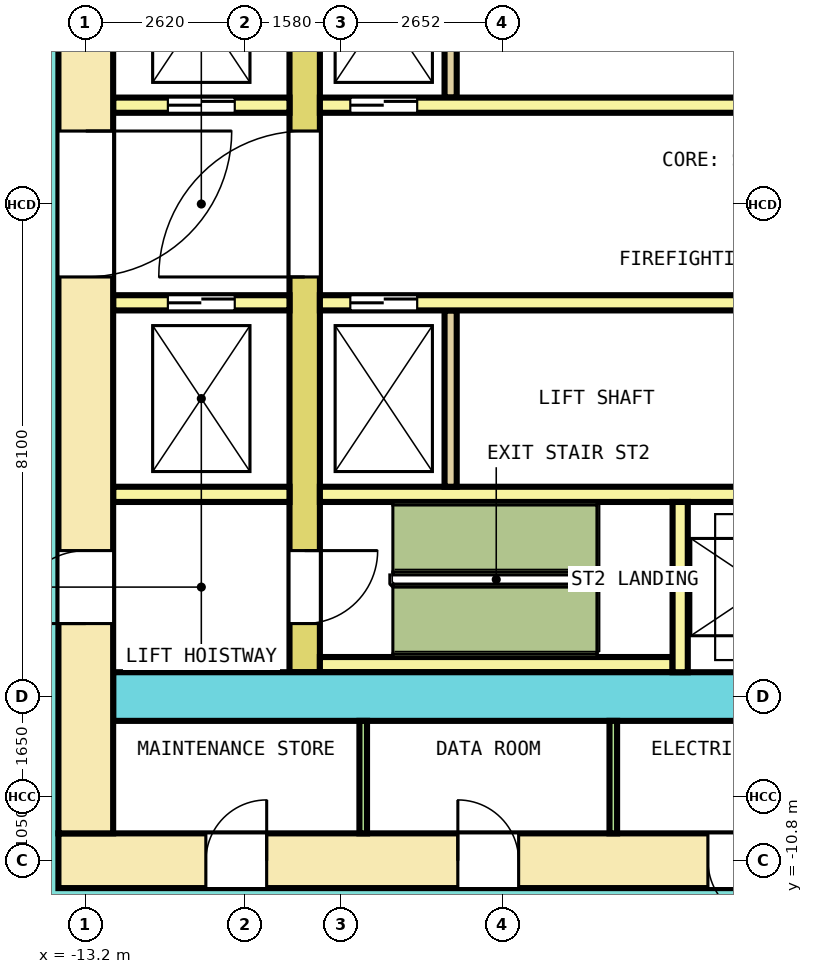
"""IFC4 building model, lengths in metres.
Left out: names, types, materials, properties, quantities, classifications, styles, units other than length and angle.
Written with IfcOpenShell. Run it as: python <this file> out.ifc"""

import sys

from ifc_helpers import new_model, si_unit, direction, frame, frame_2d, origin, place, context, subcontext, project, spatial, rectangle, extrude, element, fill, save


model = new_model("IFC4")
c1 = context("Model", 3, precision=1e-05, world=origin(), true_north=direction((0.0, 1.0)))
c2 = subcontext(c1, "Body", "Model", "MODEL_VIEW")
j1 = project(units=[si_unit("LENGTHUNIT", "METRE"), si_unit("PLANEANGLEUNIT", "RADIAN")], contexts=[c1])
p1 = place(None, origin())
s1 = spatial("IfcSite", under=j1, at=p1, CompositionType="ELEMENT")
p2 = place(p1, origin())
s2 = spatial("IfcBuilding", under=s1, at=p2, CompositionType="ELEMENT")
p3 = place(p2, frame((0.0, 0.0, 5.6)))
s3 = spatial("IfcBuildingStorey", under=s2, at=p3, CompositionType="ELEMENT", Elevation=5.6)
p4 = place(p3, frame((-13.65, -10.8, 0.0), z_axis=(0.0, 0.0, 1.0), x_axis=(1.0, 0.0, 0.0)))
e1 = element("IfcWall", 1, at=p4, inside=s3, PredefinedType="SHEAR", context=c2, shape_type="SweptSolid", body=[
    extrude(rectangle(XDim=27.3, YDim=0.9, at=frame_2d((13.65, 0.0))), origin(), (0.0, 0.0, 1.0), 4.3),
])
p5 = place(p4, frame((2.425, 0.0, 0.0)))
e2 = element("IfcOpeningElement", 2, at=p5, cuts=e1, PredefinedType="OPENING", context=c2, shape_type="SweptSolid", body=[
    extrude(rectangle(XDim=1.0, YDim=2.1, at=frame_2d((0.5, 1.05))), frame((0.0, 0.46, 0.0), z_axis=(0.0, -1.0, 0.0), x_axis=(1.0, 0.0, 0.0)), (0.0, 0.0, 1.0), 0.92),
])
p6 = place(p4, frame((6.569, 0.0, 0.0)))
e3 = element("IfcOpeningElement", 3, at=p6, cuts=e1, PredefinedType="OPENING", context=c2, shape_type="SweptSolid", body=[
    extrude(rectangle(XDim=1.0, YDim=2.1, at=frame_2d((0.5, 1.05))), frame((0.0, 0.46, 0.0), z_axis=(0.0, -1.0, 0.0), x_axis=(1.0, 0.0, 0.0)), (0.0, 0.0, 1.0), 0.92),
])
p7 = place(p4, frame((10.681, 0.0, 0.0)))
e4 = element("IfcOpeningElement", 4, at=p7, cuts=e1, PredefinedType="OPENING", context=c2, shape_type="SweptSolid", body=[
    extrude(rectangle(XDim=1.0, YDim=2.1, at=frame_2d((0.5, 1.05))), frame((0.0, 0.46, 0.0), z_axis=(0.0, -1.0, 0.0), x_axis=(1.0, 0.0, 0.0)), (0.0, 0.0, 1.0), 0.92),
])
p8 = place(p4, frame((19.202, 0.0, 0.0)))
e5 = element("IfcOpeningElement", 5, at=p8, cuts=e1, PredefinedType="OPENING", context=c2, shape_type="SweptSolid", body=[
    extrude(rectangle(XDim=1.0, YDim=2.1, at=frame_2d((0.5, 1.05))), frame((0.0, 0.46, 0.0), z_axis=(0.0, -1.0, 0.0), x_axis=(1.0, 0.0, 0.0)), (0.0, 0.0, 1.0), 0.92),
])
p9 = place(p4, frame((21.881, 0.0, 0.0)))
e6 = element("IfcOpeningElement", 6, at=p9, cuts=e1, PredefinedType="OPENING", context=c2, shape_type="SweptSolid", body=[
    extrude(rectangle(XDim=1.0, YDim=2.1, at=frame_2d((0.5, 1.05))), frame((0.0, 0.46, 0.0), z_axis=(0.0, -1.0, 0.0), x_axis=(1.0, 0.0, 0.0)), (0.0, 0.0, 1.0), 0.92),
])
p10 = place(p4, frame((24.592, 0.0, 0.0)))
e7 = element("IfcOpeningElement", 7, at=p10, cuts=e1, PredefinedType="OPENING", context=c2, shape_type="SweptSolid", body=[
    extrude(rectangle(XDim=1.0, YDim=2.1, at=frame_2d((0.5, 1.05))), frame((0.0, 0.46, 0.0), z_axis=(0.0, -1.0, 0.0), x_axis=(1.0, 0.0, 0.0)), (0.0, 0.0, 1.0), 0.92),
])
p11 = place(p4, frame((15.2, 0.0, 0.0)))
e8 = element("IfcOpeningElement", 8, at=p11, cuts=e1, PredefinedType="OPENING", context=c2, shape_type="SweptSolid", body=[
    extrude(rectangle(XDim=1.2, YDim=2.1, at=frame_2d((0.6, 1.05))), frame((0.0, 0.46, 0.0), z_axis=(0.0, -1.0, 0.0), x_axis=(1.0, 0.0, 0.0)), (0.0, 0.0, 1.0), 0.92),
])
p12 = place(p3, frame((-13.2, -10.35, 0.0), z_axis=(0.0, 0.0, 1.0), x_axis=(0.0, 1.0, 0.0)))
e9 = element("IfcWall", 9, at=p12, inside=s3, PredefinedType="SHEAR", context=c2, shape_type="SweptSolid", body=[
    extrude(rectangle(XDim=20.7, YDim=0.9, at=frame_2d((10.35, 0.0))), origin(), (0.0, 0.0, 1.0), 4.3),
])
p13 = place(p12, frame((9.15, 0.0, 0.0)))
e10 = element("IfcOpeningElement", 10, at=p13, cuts=e9, PredefinedType="OPENING", context=c2, shape_type="SweptSolid", body=[
    extrude(rectangle(XDim=2.4, YDim=2.1, at=frame_2d((1.2, 1.05))), frame((0.0, 0.46, 0.0), z_axis=(0.0, -1.0, 0.0), x_axis=(1.0, 0.0, 0.0)), (0.0, 0.0, 1.0), 0.92),
])
p14 = place(p12, frame((16.05, 0.0, 0.0)))
e11 = element("IfcOpeningElement", 11, at=p14, cuts=e9, PredefinedType="OPENING", context=c2, shape_type="SweptSolid", body=[
    extrude(rectangle(XDim=1.2, YDim=2.1, at=frame_2d((0.6, 1.05))), frame((0.0, 0.46, 0.0), z_axis=(0.0, -1.0, 0.0), x_axis=(1.0, 0.0, 0.0)), (0.0, 0.0, 1.0), 0.92),
])
p15 = place(p12, frame((3.45, 0.0, 0.0)))
e12 = element("IfcOpeningElement", 12, at=p15, cuts=e9, PredefinedType="OPENING", context=c2, shape_type="SweptSolid", body=[
    extrude(rectangle(XDim=1.2, YDim=2.1, at=frame_2d((0.6, 1.05))), frame((0.0, 0.46, 0.0), z_axis=(0.0, -1.0, 0.0), x_axis=(1.0, 0.0, 0.0)), (0.0, 0.0, 1.0), 0.92),
])
p16 = place(p3, frame((-12.75, -8.1, 0.0), z_axis=(0.0, 0.0, 1.0), x_axis=(1.0, 0.0, 0.0)))
e13 = element("IfcWall", 13, at=p16, inside=s3, PredefinedType="SHEAR", context=c2, shape_type="SweptSolid", body=[
    extrude(rectangle(XDim=25.5, YDim=0.8, at=frame_2d((12.75, 0.0))), origin(), (0.0, 0.0, 1.0), 4.3),
])
p17 = place(p16, frame((14.3, 0.0, 0.0)))
e14 = element("IfcOpeningElement", 14, at=p17, cuts=e13, PredefinedType="OPENING", context=c2, shape_type="SweptSolid", body=[
    extrude(rectangle(XDim=1.2, YDim=2.1, at=frame_2d((0.6, 1.05))), frame((0.0, 0.41, 0.0), z_axis=(0.0, -1.0, 0.0), x_axis=(1.0, 0.0, 0.0)), (0.0, 0.0, 1.0), 0.82),
])
p18 = place(p3, frame((-9.6, -7.7, 0.0), z_axis=(0.0, 0.0, 1.0), x_axis=(0.0, 1.0, 0.0)))
e15 = element("IfcWall", 15, at=p18, inside=s3, PredefinedType="SHEAR", context=c2, shape_type="SweptSolid", body=[
    extrude(rectangle(XDim=15.4, YDim=0.5, at=frame_2d((7.7, 0.0))), origin(), (0.0, 0.0, 1.0), 4.3),
])
p19 = place(p18, frame((6.5, 0.0, 0.0)))
e16 = element("IfcOpeningElement", 16, at=p19, cuts=e15, PredefinedType="OPENING", context=c2, shape_type="SweptSolid", body=[
    extrude(rectangle(XDim=2.4, YDim=2.1, at=frame_2d((1.2, 1.05))), frame((0.0, 0.26, 0.0), z_axis=(0.0, -1.0, 0.0), x_axis=(1.0, 0.0, 0.0)), (0.0, 0.0, 1.0), 0.52),
])
p20 = place(p18, frame((13.4, 0.0, 0.0)))
e17 = element("IfcOpeningElement", 17, at=p20, cuts=e15, PredefinedType="OPENING", context=c2, shape_type="SweptSolid", body=[
    extrude(rectangle(XDim=1.2, YDim=2.1, at=frame_2d((0.6, 1.05))), frame((0.0, 0.26, 0.0), z_axis=(0.0, -1.0, 0.0), x_axis=(1.0, 0.0, 0.0)), (0.0, 0.0, 1.0), 0.52),
])
p21 = place(p18, frame((0.8, 0.0, 0.0)))
e18 = element("IfcOpeningElement", 18, at=p21, cuts=e15, PredefinedType="OPENING", context=c2, shape_type="SweptSolid", body=[
    extrude(rectangle(XDim=1.2, YDim=2.1, at=frame_2d((0.6, 1.05))), frame((0.0, 0.26, 0.0), z_axis=(0.0, -1.0, 0.0), x_axis=(1.0, 0.0, 0.0)), (0.0, 0.0, 1.0), 0.52),
])
p22 = place(p3, frame((-12.75, 1.625, 0.0), z_axis=(0.0, 0.0, 1.0), x_axis=(1.0, 0.0, 0.0)))
e19 = element("IfcWall", 19, at=p22, inside=s3, PredefinedType="SOLIDWALL", context=c2, shape_type="SweptSolid", body=[
    extrude(rectangle(XDim=2.9, YDim=0.25, at=frame_2d((1.45, 0.0))), origin(), (0.0, 0.0, 1.0), 4.3),
])
p23 = place(p22, frame((0.9, 0.0, 0.0)))
e20 = element("IfcOpeningElement", 20, at=p23, cuts=e19, PredefinedType="OPENING", context=c2, shape_type="SweptSolid", body=[
    extrude(rectangle(XDim=1.1, YDim=2.1, at=frame_2d((0.55, 1.05))), frame((0.0, 0.135, 0.0), z_axis=(0.0, -1.0, 0.0), x_axis=(1.0, 0.0, 0.0)), (0.0, 0.0, 1.0), 0.27),
])
p24 = place(p3, frame((-9.35, 1.625, 0.0), z_axis=(0.0, 0.0, 1.0), x_axis=(1.0, 0.0, 0.0)))
e21 = element("IfcWall", 21, at=p24, inside=s3, PredefinedType="SOLIDWALL", context=c2, shape_type="SweptSolid", body=[
    extrude(rectangle(XDim=18.7, YDim=0.25, at=frame_2d((9.35, 0.0))), origin(), (0.0, 0.0, 1.0), 4.3),
])
p25 = place(p24, frame((0.5, 0.0, 0.0)))
e22 = element("IfcOpeningElement", 22, at=p25, cuts=e21, PredefinedType="OPENING", context=c2, shape_type="SweptSolid", body=[
    extrude(rectangle(XDim=1.1, YDim=2.1, at=frame_2d((0.55, 1.05))), frame((0.0, 0.135, 0.0), z_axis=(0.0, -1.0, 0.0), x_axis=(1.0, 0.0, 0.0)), (0.0, 0.0, 1.0), 0.27),
])
p26 = place(p24, frame((17.1, 0.0, 0.0)))
e23 = element("IfcOpeningElement", 23, at=p26, cuts=e21, PredefinedType="OPENING", context=c2, shape_type="SweptSolid", body=[
    extrude(rectangle(XDim=1.1, YDim=2.1, at=frame_2d((0.55, 1.05))), frame((0.0, 0.135, 0.0), z_axis=(0.0, -1.0, 0.0), x_axis=(1.0, 0.0, 0.0)), (0.0, 0.0, 1.0), 0.27),
])
p27 = place(p3, frame((-7.2, 1.75, 0.0), z_axis=(0.0, 0.0, 1.0), x_axis=(0.0, 1.0, 0.0)))
e24 = element("IfcWall", 24, at=p27, inside=s3, PredefinedType="SOLIDWALL", context=c2, shape_type="SweptSolid", body=[
    extrude(rectangle(XDim=2.9, YDim=0.2, at=frame_2d((1.45, 0.0))), origin(), (0.0, 0.0, 1.0), 4.3),
])
p28 = place(p3, frame((-12.75, -1.625, 0.0), z_axis=(0.0, 0.0, 1.0), x_axis=(1.0, 0.0, 0.0)))
e25 = element("IfcWall", 25, at=p28, inside=s3, PredefinedType="SOLIDWALL", context=c2, shape_type="SweptSolid", body=[
    extrude(rectangle(XDim=2.9, YDim=0.25, at=frame_2d((1.45, 0.0))), origin(), (0.0, 0.0, 1.0), 4.3),
])
p29 = place(p28, frame((0.9, 0.0, 0.0)))
e26 = element("IfcOpeningElement", 26, at=p29, cuts=e25, PredefinedType="OPENING", context=c2, shape_type="SweptSolid", body=[
    extrude(rectangle(XDim=1.1, YDim=2.1, at=frame_2d((0.55, 1.05))), frame((0.0, 0.135, 0.0), z_axis=(0.0, -1.0, 0.0), x_axis=(1.0, 0.0, 0.0)), (0.0, 0.0, 1.0), 0.27),
])
p30 = place(p3, frame((-9.35, -1.625, 0.0), z_axis=(0.0, 0.0, 1.0), x_axis=(1.0, 0.0, 0.0)))
e27 = element("IfcWall", 27, at=p30, inside=s3, PredefinedType="SOLIDWALL", context=c2, shape_type="SweptSolid", body=[
    extrude(rectangle(XDim=18.7, YDim=0.25, at=frame_2d((9.35, 0.0))), origin(), (0.0, 0.0, 1.0), 4.3),
])
p31 = place(p30, frame((0.5, 0.0, 0.0)))
e28 = element("IfcOpeningElement", 28, at=p31, cuts=e27, PredefinedType="OPENING", context=c2, shape_type="SweptSolid", body=[
    extrude(rectangle(XDim=1.1, YDim=2.1, at=frame_2d((0.55, 1.05))), frame((0.0, 0.135, 0.0), z_axis=(0.0, -1.0, 0.0), x_axis=(1.0, 0.0, 0.0)), (0.0, 0.0, 1.0), 0.27),
])
p32 = place(p30, frame((17.1, 0.0, 0.0)))
e29 = element("IfcOpeningElement", 29, at=p32, cuts=e27, PredefinedType="OPENING", context=c2, shape_type="SweptSolid", body=[
    extrude(rectangle(XDim=1.1, YDim=2.1, at=frame_2d((0.55, 1.05))), frame((0.0, 0.135, 0.0), z_axis=(0.0, -1.0, 0.0), x_axis=(1.0, 0.0, 0.0)), (0.0, 0.0, 1.0), 0.27),
])
p33 = place(p3, frame((-12.75, -4.775, 0.0), z_axis=(0.0, 0.0, 1.0), x_axis=(1.0, 0.0, 0.0)))
e30 = element("IfcWall", 30, at=p33, inside=s3, PredefinedType="SOLIDWALL", context=c2, shape_type="SweptSolid", body=[
    extrude(rectangle(XDim=2.9, YDim=0.25, at=frame_2d((1.45, 0.0))), origin(), (0.0, 0.0, 1.0), 4.3),
])
p34 = place(p3, frame((-9.35, -4.775, 0.0), z_axis=(0.0, 0.0, 1.0), x_axis=(1.0, 0.0, 0.0)))
e31 = element("IfcWall", 31, at=p34, inside=s3, PredefinedType="SOLIDWALL", context=c2, shape_type="SweptSolid", body=[
    extrude(rectangle(XDim=18.7, YDim=0.25, at=frame_2d((9.35, 0.0))), origin(), (0.0, 0.0, 1.0), 4.3),
])
p35 = place(p3, frame((-7.2, -4.65, 0.0), z_axis=(0.0, 0.0, 1.0), x_axis=(0.0, 1.0, 0.0)))
e32 = element("IfcWall", 32, at=p35, inside=s3, PredefinedType="SOLIDWALL", context=c2, shape_type="SweptSolid", body=[
    extrude(rectangle(XDim=2.9, YDim=0.2, at=frame_2d((1.45, 0.0))), origin(), (0.0, 0.0, 1.0), 4.3),
])
p36 = place(p3, frame((-9.35, -7.575, 0.0), z_axis=(0.0, 0.0, 1.0), x_axis=(1.0, 0.0, 0.0)))
e33 = element("IfcWall", 33, at=p36, inside=s3, PredefinedType="SOLIDWALL", context=c2, shape_type="SweptSolid", body=[
    extrude(rectangle(XDim=5.8, YDim=0.25, at=frame_2d((2.9, 0.0))), origin(), (0.0, 0.0, 1.0), 4.3),
])
p37 = place(p3, frame((-3.425, -7.7, 0.0), z_axis=(0.0, 0.0, 1.0), x_axis=(0.0, 1.0, 0.0)))
e34 = element("IfcWall", 34, at=p37, inside=s3, PredefinedType="SOLIDWALL", context=c2, shape_type="SweptSolid", body=[
    extrude(rectangle(XDim=2.8, YDim=0.25, at=frame_2d((1.4, 0.0))), origin(), (0.0, 0.0, 1.0), 4.3),
])
for number, where, z_axis, x_axis in (
    (35, (-8.637, -10.35, 0.0), (0.0, 0.0, 1.0), (0.0, 1.0, 0.0)),
    (36, (-4.525, -10.35, 0.0), (0.0, 0.0, 1.0), (0.0, 1.0, 0.0)),
):
    element("IfcWall", number, at=place(p3, frame(where, z_axis=z_axis, x_axis=x_axis)), inside=s3, PredefinedType="PARTITIONING", context=c2, shape_type="SweptSolid", body=[
        extrude(rectangle(XDim=1.85, YDim=0.125, at=frame_2d((0.925, 0.0))), origin(), (0.0, 0.0, 1.0), 4.3),
    ])
p38 = place(p23, origin())
e37 = element("IfcDoor", 37, at=p38, inside=s3, OperationType="DOUBLE_DOOR_SLIDING", PredefinedType="DOOR", context=c2, shape_type="SweptSolid", body=[
    extrude(rectangle(XDim=1.1, YDim=2.1, at=frame_2d((0.55, 1.05))), frame((0.0, 0.075, 0.0), z_axis=(0.0, -1.0, 0.0), x_axis=(1.0, 0.0, 0.0)), (0.0, 0.0, 1.0), 0.15),
])
fill(e20, e37)
p39 = place(p25, origin())
e38 = element("IfcDoor", 38, at=p39, inside=s3, OperationType="DOUBLE_DOOR_SLIDING", PredefinedType="DOOR", context=c2, shape_type="SweptSolid", body=[
    extrude(rectangle(XDim=1.1, YDim=2.1, at=frame_2d((0.55, 1.05))), frame((0.0, 0.075, 0.0), z_axis=(0.0, -1.0, 0.0), x_axis=(1.0, 0.0, 0.0)), (0.0, 0.0, 1.0), 0.15),
])
fill(e22, e38)
p40 = place(p29, origin())
e39 = element("IfcDoor", 39, at=p40, inside=s3, OperationType="DOUBLE_DOOR_SLIDING", PredefinedType="DOOR", context=c2, shape_type="SweptSolid", body=[
    extrude(rectangle(XDim=1.1, YDim=2.1, at=frame_2d((0.55, 1.05))), frame((0.0, 0.075, 0.0), z_axis=(0.0, -1.0, 0.0), x_axis=(1.0, 0.0, 0.0)), (0.0, 0.0, 1.0), 0.15),
])
fill(e26, e39)
p41 = place(p31, origin())
e40 = element("IfcDoor", 40, at=p41, inside=s3, OperationType="DOUBLE_DOOR_SLIDING", PredefinedType="DOOR", context=c2, shape_type="SweptSolid", body=[
    extrude(rectangle(XDim=1.1, YDim=2.1, at=frame_2d((0.55, 1.05))), frame((0.0, 0.075, 0.0), z_axis=(0.0, -1.0, 0.0), x_axis=(1.0, 0.0, 0.0)), (0.0, 0.0, 1.0), 0.15),
])
fill(e28, e40)
p42 = place(p19, origin())
e41 = element("IfcDoor", 41, at=p42, inside=s3, OperationType="DOUBLE_DOOR_SINGLE_SWING", PredefinedType="DOOR", context=c2, shape_type="SweptSolid", body=[
    extrude(rectangle(XDim=2.4, YDim=2.1, at=frame_2d((1.2, 1.05))), frame((0.0, 0.2, 0.0), z_axis=(0.0, -1.0, 0.0), x_axis=(1.0, 0.0, 0.0)), (0.0, 0.0, 1.0), 0.4),
])
fill(e16, e41)
p43 = place(p13, origin())
e42 = element("IfcDoor", 42, at=p43, inside=s3, OperationType="DOUBLE_DOOR_SINGLE_SWING", PredefinedType="DOOR", context=c2, shape_type="SweptSolid", body=[
    extrude(rectangle(XDim=2.4, YDim=2.1, at=frame_2d((1.2, 1.05))), frame((0.0, 0.3, 0.0), z_axis=(0.0, -1.0, 0.0), x_axis=(1.0, 0.0, 0.0)), (0.0, 0.0, 1.0), 0.6),
])
fill(e10, e42)
p44 = place(p21, origin())
e43 = element("IfcDoor", 43, at=p44, inside=s3, OperationType="SINGLE_SWING_LEFT", PredefinedType="DOOR", context=c2, shape_type="SweptSolid", body=[
    extrude(rectangle(XDim=1.2, YDim=2.1, at=frame_2d((0.6, 1.05))), frame((0.0, 0.2, 0.0), z_axis=(0.0, -1.0, 0.0), x_axis=(1.0, 0.0, 0.0)), (0.0, 0.0, 1.0), 0.4),
])
fill(e18, e43)
p45 = place(p15, origin())
e44 = element("IfcDoor", 44, at=p45, inside=s3, OperationType="SINGLE_SWING_RIGHT", PredefinedType="DOOR", context=c2, shape_type="SweptSolid", body=[
    extrude(rectangle(XDim=1.2, YDim=2.1, at=frame_2d((0.6, 1.05))), frame((0.0, 0.3, 0.0), z_axis=(0.0, -1.0, 0.0), x_axis=(1.0, 0.0, 0.0)), (0.0, 0.0, 1.0), 0.6),
])
fill(e12, e44)
p46 = place(p5, origin())
e45 = element("IfcDoor", 45, at=p46, inside=s3, OperationType="SINGLE_SWING_RIGHT", PredefinedType="DOOR", context=c2, shape_type="SweptSolid", body=[
    extrude(rectangle(XDim=1.0, YDim=2.1, at=frame_2d((0.5, 1.05))), frame((0.0, 0.3, 0.0), z_axis=(0.0, -1.0, 0.0), x_axis=(1.0, 0.0, 0.0)), (0.0, 0.0, 1.0), 0.6),
])
fill(e2, e45)
p47 = place(p6, origin())
e46 = element("IfcDoor", 46, at=p47, inside=s3, OperationType="SINGLE_SWING_LEFT", PredefinedType="DOOR", context=c2, shape_type="SweptSolid", body=[
    extrude(rectangle(XDim=1.0, YDim=2.1, at=frame_2d((0.5, 1.05))), frame((0.0, 0.3, 0.0), z_axis=(0.0, -1.0, 0.0), x_axis=(1.0, 0.0, 0.0)), (0.0, 0.0, 1.0), 0.6),
])
fill(e3, e46)
p48 = place(p7, origin())
e47 = element("IfcDoor", 47, at=p48, inside=s3, OperationType="SINGLE_SWING_RIGHT", PredefinedType="DOOR", context=c2, shape_type="SweptSolid", body=[
    extrude(rectangle(XDim=1.0, YDim=2.1, at=frame_2d((0.5, 1.05))), frame((0.0, 0.3, 0.0), z_axis=(0.0, -1.0, 0.0), x_axis=(1.0, 0.0, 0.0)), (0.0, 0.0, 1.0), 0.6),
])
fill(e4, e47)
save(model, sys.argv[1])
